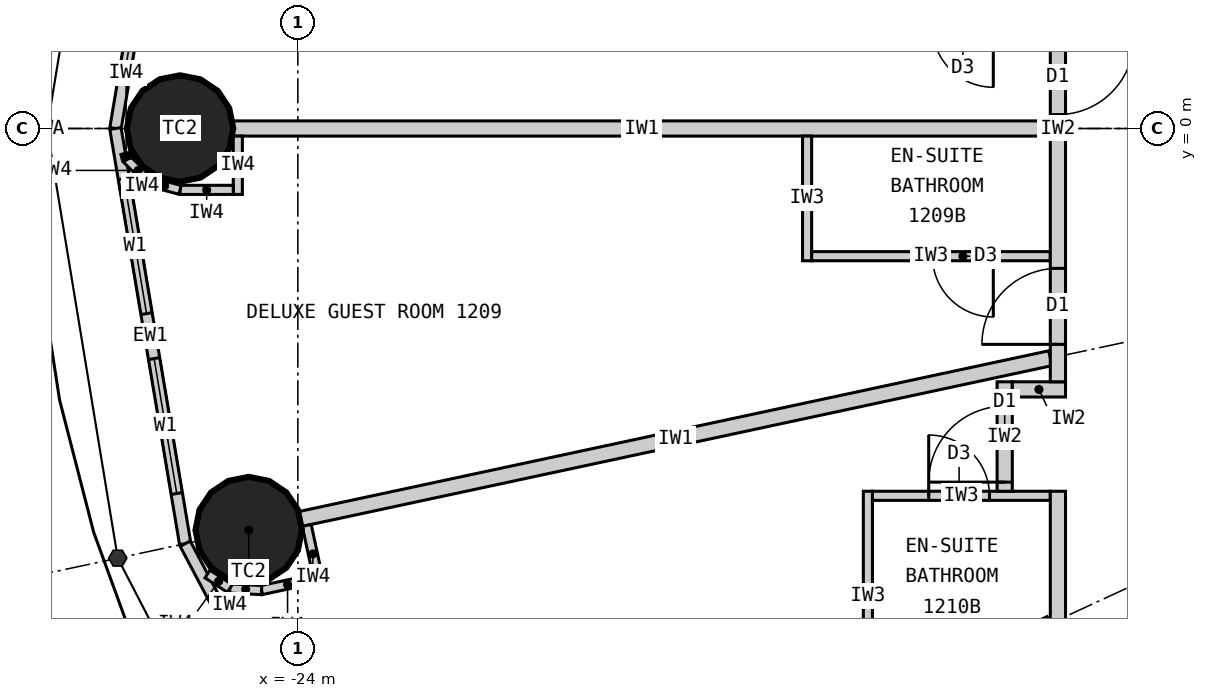
"""IFC4 building model, lengths in metres.
Left out: names, types, materials, properties, quantities, classifications, styles, units other than length and angle.
Written with IfcOpenShell. Run it as: python <this file> out.ifc"""

import sys

from ifc_helpers import new_model, si_unit, direction, frame, frame_2d, origin, origin_2d, place, context, subcontext, project, spatial, rectangle, circle, extrude, element, fill, save


model = new_model("IFC4")
c1 = context("Model", 3, precision=1e-05, world=origin(), true_north=direction((0.0, 1.0)))
c2 = subcontext(c1, "Body", "Model", "MODEL_VIEW")
j1 = project(units=[si_unit("LENGTHUNIT", "METRE"), si_unit("PLANEANGLEUNIT", "RADIAN")], contexts=[c1])
p1 = place(None, origin())
s1 = spatial("IfcSite", under=j1, at=p1, CompositionType="ELEMENT")
p2 = place(p1, origin())
s2 = spatial("IfcBuilding", under=s1, at=p2, CompositionType="ELEMENT")
p3 = place(p2, frame((0.0, 0.0, 54.0)))
s3 = spatial("IfcBuildingStorey", under=s2, at=p3, CompositionType="ELEMENT", Elevation=54.0)
for number, where, z_axis, x_axis in (
    (1, (-25.55, 0.0, 0.0), (0.0, 0.0, 1.0), (1.0, 0.0, 0.0)),
    (2, (-24.647, -5.283, 0.0), (0.0, 0.0, 1.0), (1.0, 0.0, 0.0)),
):
    element("IfcColumn", number, at=place(p3, frame(where, z_axis=z_axis, x_axis=x_axis)), inside=s3, PredefinedType="COLUMN", context=c2, shape_type="SweptSolid", body=[
        extrude(circle(Radius=0.7, at=origin_2d()), origin(), (0.0, 0.0, 1.0), 3.3),
    ])
p4 = place(p3, frame((-25.482, 5.462, 0.0), z_axis=(0.0, 0.0, 1.0), x_axis=(-0.165642551694, -0.986185857264, 0.0)))
e3 = element("IfcWall", 3, at=p4, inside=s3, PredefinedType="ELEMENTEDWALL", context=c2, shape_type="SweptSolid", body=[
    extrude(rectangle(XDim=5.539, YDim=0.15, at=frame_2d((2.77, 0.0))), origin(), (0.0, 0.0, 1.0), 3.12),
])
p5 = place(p4, frame((0.669, 0.0, 0.9)))
e4 = element("IfcOpeningElement", 4, at=p5, cuts=e3, PredefinedType="OPENING", context=c2, shape_type="SweptSolid", body=[
    extrude(rectangle(XDim=1.8, YDim=1.9, at=frame_2d((0.9, 0.95))), frame((0.0, 0.085, 0.0), z_axis=(0.0, -1.0, 0.0), x_axis=(1.0, 0.0, 0.0)), (0.0, 0.0, 1.0), 0.17),
])
p6 = place(p4, frame((3.07, 0.0, 0.9)))
e5 = element("IfcOpeningElement", 5, at=p6, cuts=e3, PredefinedType="OPENING", context=c2, shape_type="SweptSolid", body=[
    extrude(rectangle(XDim=1.8, YDim=1.9, at=frame_2d((0.9, 0.95))), frame((0.0, 0.085, 0.0), z_axis=(0.0, -1.0, 0.0), x_axis=(1.0, 0.0, 0.0)), (0.0, 0.0, 1.0), 0.17),
])
p7 = place(p3, frame((-26.4, 0.0, 0.0), z_axis=(0.0, 0.0, 1.0), x_axis=(0.165642551694, -0.986185857264, 0.0)))
e6 = element("IfcWall", 6, at=p7, inside=s3, PredefinedType="ELEMENTEDWALL", context=c2, shape_type="SweptSolid", body=[
    extrude(rectangle(XDim=5.539, YDim=0.15, at=frame_2d((2.77, 0.0))), origin(), (0.0, 0.0, 1.0), 3.12),
])
p8 = place(p7, frame((0.669, 0.0, 0.9)))
e7 = element("IfcOpeningElement", 7, at=p8, cuts=e6, PredefinedType="OPENING", context=c2, shape_type="SweptSolid", body=[
    extrude(rectangle(XDim=1.8, YDim=1.9, at=frame_2d((0.9, 0.95))), frame((0.0, 0.085, 0.0), z_axis=(0.0, -1.0, 0.0), x_axis=(1.0, 0.0, 0.0)), (0.0, 0.0, 1.0), 0.17),
])
p9 = place(p7, frame((3.07, 0.0, 0.9)))
e8 = element("IfcOpeningElement", 8, at=p9, cuts=e6, PredefinedType="OPENING", context=c2, shape_type="SweptSolid", body=[
    extrude(rectangle(XDim=1.8, YDim=1.9, at=frame_2d((0.9, 0.95))), frame((0.0, 0.085, 0.0), z_axis=(0.0, -1.0, 0.0), x_axis=(1.0, 0.0, 0.0)), (0.0, 0.0, 1.0), 0.17),
])
p10 = place(p3, frame((-25.482, -5.462, 0.0), z_axis=(0.0, 0.0, 1.0), x_axis=(0.467296867008, -0.884100468321, 0.0)))
e9 = element("IfcWall", 9, at=p10, inside=s3, PredefinedType="ELEMENTEDWALL", context=c2, shape_type="SweptSolid", body=[
    extrude(rectangle(XDim=5.734, YDim=0.15, at=frame_2d((2.867, 0.0))), origin(), (0.0, 0.0, 1.0), 3.12),
])
p11 = place(p10, frame((0.767, 0.0, 0.9)))
e10 = element("IfcOpeningElement", 10, at=p11, cuts=e9, PredefinedType="OPENING", context=c2, shape_type="SweptSolid", body=[
    extrude(rectangle(XDim=1.8, YDim=1.9, at=frame_2d((0.9, 0.95))), frame((0.0, 0.085, 0.0), z_axis=(0.0, -1.0, 0.0), x_axis=(1.0, 0.0, 0.0)), (0.0, 0.0, 1.0), 0.17),
])
p12 = place(p10, frame((3.167, 0.0, 0.9)))
e11 = element("IfcOpeningElement", 11, at=p12, cuts=e9, PredefinedType="OPENING", context=c2, shape_type="SweptSolid", body=[
    extrude(rectangle(XDim=1.8, YDim=1.9, at=frame_2d((0.9, 0.95))), frame((0.0, 0.085, 0.0), z_axis=(0.0, -1.0, 0.0), x_axis=(1.0, 0.0, 0.0)), (0.0, 0.0, 1.0), 0.17),
])
p13 = place(p3, frame((-14.1, 0.0, 0.0), z_axis=(0.0, 0.0, 1.0), x_axis=(-1.0, 0.0, 0.0)))
e12 = element("IfcWall", 12, at=p13, inside=s3, PredefinedType="PARTITIONING", context=c2, shape_type="SweptSolid", body=[
    extrude(rectangle(XDim=10.75, YDim=0.2, at=frame_2d((5.375, 0.0))), origin(), (0.0, 0.0, 1.0), 2.27),
])
p14 = place(p3, frame((-14.1, -3.022, 0.0), z_axis=(0.0, 0.0, 1.0), x_axis=(-0.977790014929, -0.209586943072, 0.0)))
e13 = element("IfcWall", 13, at=p14, inside=s3, PredefinedType="PARTITIONING", context=c2, shape_type="SweptSolid", body=[
    extrude(rectangle(XDim=10.087, YDim=0.2, at=frame_2d((5.043, 0.0))), origin(), (0.0, 0.0, 1.0), 2.32),
])
p15 = place(p3, frame((-14.1, -6.512, 0.0), z_axis=(0.0, 0.0, 1.0), x_axis=(-0.907832871056, -0.419332181247, 0.0)))
e14 = element("IfcWall", 14, at=p15, inside=s3, PredefinedType="PARTITIONING", context=c2, shape_type="SweptSolid", body=[
    extrude(rectangle(XDim=8.023, YDim=0.2, at=frame_2d((4.011, 0.0))), origin(), (0.0, 0.0, 1.0), 2.32),
])
p16 = place(p3, frame((-17.3, -0.1, 0.0), z_axis=(0.0, 0.0, 1.0), x_axis=(0.0, -1.0, 0.0)))
e15 = element("IfcWall", 15, at=p16, inside=s3, PredefinedType="PARTITIONING", context=c2, shape_type="SweptSolid", body=[
    extrude(rectangle(XDim=1.64, YDim=0.12, at=frame_2d((0.82, 0.0))), origin(), (0.0, 0.0, 1.0), 3.12),
])
p17 = place(p3, frame((-14.1, -1.68, 0.0), z_axis=(0.0, 0.0, 1.0), x_axis=(-1.0, 0.0, 0.0)))
e16 = element("IfcWall", 16, at=p17, inside=s3, PredefinedType="PARTITIONING", context=c2, shape_type="SweptSolid", body=[
    extrude(rectangle(XDim=3.14, YDim=0.12, at=frame_2d((1.57, 0.0))), origin(), (0.0, 0.0, 1.0), 3.12),
])
p18 = place(p17, frame((0.75, 0.0, 0.0)))
e17 = element("IfcOpeningElement", 17, at=p18, cuts=e16, PredefinedType="OPENING", context=c2, shape_type="SweptSolid", body=[
    extrude(rectangle(XDim=0.8, YDim=2.1, at=frame_2d((0.4, 1.05))), frame((0.0, 0.07, 0.0), z_axis=(0.0, -1.0, 0.0), x_axis=(1.0, 0.0, 0.0)), (0.0, 0.0, 1.0), 0.14),
])
p19 = place(p3, frame((-16.5, -7.521, 0.0), z_axis=(0.0, 0.0, 1.0), x_axis=(0.0, 1.0, 0.0)))
e18 = element("IfcWall", 18, at=p19, inside=s3, PredefinedType="PARTITIONING", context=c2, shape_type="SweptSolid", body=[
    extrude(rectangle(XDim=2.749, YDim=0.12, at=frame_2d((1.374, 0.0))), origin(), (0.0, 0.0, 1.0), 3.12),
])
p20 = place(p3, frame((-14.1, -4.833, 0.0), z_axis=(0.0, 0.0, 1.0), x_axis=(-1.0, 0.0, 0.0)))
e19 = element("IfcWall", 19, at=p20, inside=s3, PredefinedType="PARTITIONING", context=c2, shape_type="SweptSolid", body=[
    extrude(rectangle(XDim=2.34, YDim=0.12, at=frame_2d((1.17, 0.0))), origin(), (0.0, 0.0, 1.0), 3.12),
])
p21 = place(p20, frame((0.8, 0.0, 0.0)))
e20 = element("IfcOpeningElement", 20, at=p21, cuts=e19, PredefinedType="OPENING", context=c2, shape_type="SweptSolid", body=[
    extrude(rectangle(XDim=0.8, YDim=2.1, at=frame_2d((0.4, 1.05))), frame((0.0, 0.07, 0.0), z_axis=(0.0, -1.0, 0.0), x_axis=(1.0, 0.0, 0.0)), (0.0, 0.0, 1.0), 0.14),
])
p22 = place(p3, frame((-14.7, -3.333, 0.0), z_axis=(0.0, 0.0, 1.0), x_axis=(0.0, -1.0, 0.0)))
e21 = element("IfcWall", 21, at=p22, inside=s3, PredefinedType="PARTITIONING", context=c2, shape_type="SweptSolid", body=[
    extrude(rectangle(XDim=1.44, YDim=0.2, at=frame_2d((0.72, 0.0))), origin(), (0.0, 0.0, 1.0), 3.12),
])
p23 = place(p22, frame((0.32, 0.0, 0.0)))
e22 = element("IfcOpeningElement", 22, at=p23, cuts=e21, PredefinedType="OPENING", context=c2, shape_type="SweptSolid", body=[
    extrude(rectangle(XDim=1.0, YDim=2.2, at=frame_2d((0.5, 1.1))), frame((0.0, 0.11, 0.0), z_axis=(0.0, -1.0, 0.0), x_axis=(1.0, 0.0, 0.0)), (0.0, 0.0, 1.0), 0.22),
])
p24 = place(p3, frame((-13.9, -3.433, 0.0), z_axis=(0.0, 0.0, 1.0), x_axis=(-1.0, 0.0, 0.0)))
e23 = element("IfcWall", 23, at=p24, inside=s3, PredefinedType="PARTITIONING", context=c2, shape_type="SweptSolid", body=[
    extrude(rectangle(XDim=0.7, YDim=0.2, at=frame_2d((0.35, 0.0))), origin(), (0.0, 0.0, 1.0), 2.32),
])
p25 = place(p3, frame((-14.0, 3.333, 0.0), z_axis=(0.0, 0.0, 1.0), x_axis=(0.0, -1.0, 0.0)))
e24 = element("IfcWall", 24, at=p25, inside=s3, PredefinedType="PARTITIONING", context=c2, shape_type="SweptSolid", body=[
    extrude(rectangle(XDim=6.665, YDim=0.2, at=frame_2d((3.333, 0.0))), origin(), (0.0, 0.0, 1.0), 3.12),
])
p26 = place(p25, frame((2.15, 0.0, 0.0)))
e25 = element("IfcOpeningElement", 25, at=p26, cuts=e24, PredefinedType="OPENING", context=c2, shape_type="SweptSolid", body=[
    extrude(rectangle(XDim=1.0, YDim=2.2, at=frame_2d((0.5, 1.1))), frame((0.0, 0.11, 0.0), z_axis=(0.0, -1.0, 0.0), x_axis=(1.0, 0.0, 0.0)), (0.0, 0.0, 1.0), 0.22),
])
p27 = place(p25, frame((5.173, 0.0, 0.0)))
e26 = element("IfcOpeningElement", 26, at=p27, cuts=e24, PredefinedType="OPENING", context=c2, shape_type="SweptSolid", body=[
    extrude(rectangle(XDim=1.0, YDim=2.2, at=frame_2d((0.5, 1.1))), frame((0.0, 0.11, 0.0), z_axis=(0.0, -1.0, 0.0), x_axis=(1.0, 0.0, 0.0)), (0.0, 0.0, 1.0), 0.22),
])
p28 = place(p3, frame((-14.0, -4.772, 0.0), z_axis=(0.0, 0.0, 1.0), x_axis=(0.0, -1.0, 0.0)))
e27 = element("IfcWall", 27, at=p28, inside=s3, PredefinedType="PARTITIONING", context=c2, shape_type="SweptSolid", body=[
    extrude(rectangle(XDim=5.127, YDim=0.2, at=frame_2d((2.564, 0.0))), origin(), (0.0, 0.0, 1.0), 3.12),
])
p29 = place(p28, frame((4.025, 0.0, 0.0)))
e28 = element("IfcOpeningElement", 28, at=p29, cuts=e27, PredefinedType="OPENING", context=c2, shape_type="SweptSolid", body=[
    extrude(rectangle(XDim=1.0, YDim=2.2, at=frame_2d((0.5, 1.1))), frame((0.0, 0.11, 0.0), z_axis=(0.0, -1.0, 0.0), x_axis=(1.0, 0.0, 0.0)), (0.0, 0.0, 1.0), 0.22),
])
p30 = place(p3, frame((-24.79, -0.1, 0.0), z_axis=(0.0, 0.0, 1.0), x_axis=(0.0, -1.0, 0.0)))
e29 = element("IfcWall", 29, at=p30, inside=s3, PredefinedType="PARTITIONING", context=c2, shape_type="SweptSolid", body=[
    extrude(rectangle(XDim=0.767, YDim=0.12, at=frame_2d((0.384, 0.0))), origin(), (0.0, 0.0, 1.0), 3.12),
])
p31 = place(p3, frame((-24.85, -0.808, 0.0), z_axis=(0.0, 0.0, 1.0), x_axis=(-1.0, 0.0, 0.0)))
e30 = element("IfcWall", 30, at=p31, inside=s3, PredefinedType="PARTITIONING", context=c2, shape_type="SweptSolid", body=[
    extrude(rectangle(XDim=0.7, YDim=0.12, at=frame_2d((0.35, 0.0))), origin(), (0.0, 0.0, 1.0), 3.12),
])
p32 = place(p3, frame((-25.55, -0.808, 0.0), z_axis=(0.0, 0.0, 1.0), x_axis=(-0.965807183573, 0.2592614205, 0.0)))
e31 = element("IfcWall", 31, at=p32, inside=s3, PredefinedType="PARTITIONING", context=c2, shape_type="SweptSolid", body=[
    extrude(rectangle(XDim=0.418, YDim=0.12, at=frame_2d((0.209, 0.0))), origin(), (0.0, 0.0, 1.0), 3.12),
])
p33 = place(p3, frame((-25.954, -0.699, 0.0), z_axis=(0.0, 0.0, 1.0), x_axis=(-0.707106781187, 0.707106781187, 0.0)))
e32 = element("IfcWall", 32, at=p33, inside=s3, PredefinedType="PARTITIONING", context=c2, shape_type="SweptSolid", body=[
    extrude(rectangle(XDim=0.418, YDim=0.12, at=frame_2d((0.209, 0.0))), origin(), (0.0, 0.0, 1.0), 3.12),
])
p34 = place(p3, frame((-26.249, -0.404, 0.0), z_axis=(0.0, 0.0, 1.0), x_axis=(-0.259754282609, 0.965674744759, 0.0)))
e33 = element("IfcWall", 33, at=p34, inside=s3, PredefinedType="PARTITIONING", context=c2, shape_type="SweptSolid", body=[
    extrude(rectangle(XDim=0.08, YDim=0.12, at=frame_2d((0.04, 0.0))), origin(), (0.0, 0.0, 1.0), 3.12),
])
p35 = place(p3, frame((-23.883, -5.222, 0.0), z_axis=(0.0, 0.0, 1.0), x_axis=(0.209311842415, -0.977848941619, 0.0)))
e34 = element("IfcWall", 34, at=p35, inside=s3, PredefinedType="PARTITIONING", context=c2, shape_type="SweptSolid", body=[
    extrude(rectangle(XDim=0.768, YDim=0.12, at=frame_2d((0.384, 0.0))), origin(), (0.0, 0.0, 1.0), 3.12),
])
p36 = place(p3, frame((-23.793, -5.926, 0.0), z_axis=(0.0, 0.0, 1.0), x_axis=(-0.977792206673, -0.209576717621, 0.0)))
e35 = element("IfcWall", 35, at=p36, inside=s3, PredefinedType="PARTITIONING", context=c2, shape_type="SweptSolid", body=[
    extrude(rectangle(XDim=0.7, YDim=0.12, at=frame_2d((0.35, 0.0))), origin(), (0.0, 0.0, 1.0), 3.12),
])
p37 = place(p3, frame((-24.478, -6.073, 0.0), z_axis=(0.0, 0.0, 1.0), x_axis=(-0.998708262812, 0.05081147302, 0.0)))
e36 = element("IfcWall", 36, at=p37, inside=s3, PredefinedType="PARTITIONING", context=c2, shape_type="SweptSolid", body=[
    extrude(rectangle(XDim=0.418, YDim=0.12, at=frame_2d((0.209, 0.0))), origin(), (0.0, 0.0, 1.0), 3.12),
])
p38 = place(p3, frame((-24.895, -6.052, 0.0), z_axis=(0.0, 0.0, 1.0), x_axis=(-0.839495197275, 0.54336710772, 0.0)))
e37 = element("IfcWall", 37, at=p38, inside=s3, PredefinedType="PARTITIONING", context=c2, shape_type="SweptSolid", body=[
    extrude(rectangle(XDim=0.35, YDim=0.12, at=frame_2d((0.175, 0.0))), origin(), (0.0, 0.0, 1.0), 3.12),
])
p39 = place(p6, origin())
e38 = element("IfcWindow", 38, at=p39, inside=s3, PartitioningType="SINGLE_PANEL", PredefinedType="WINDOW", context=c2, shape_type="SweptSolid", body=[
    extrude(rectangle(XDim=1.8, YDim=1.9, at=frame_2d((0.9, 0.95))), frame((0.0, 0.03, 0.0), z_axis=(0.0, -1.0, 0.0), x_axis=(1.0, 0.0, 0.0)), (0.0, 0.0, 1.0), 0.06),
])
fill(e5, e38)
p40 = place(p8, origin())
e39 = element("IfcWindow", 39, at=p40, inside=s3, PartitioningType="SINGLE_PANEL", PredefinedType="WINDOW", context=c2, shape_type="SweptSolid", body=[
    extrude(rectangle(XDim=1.8, YDim=1.9, at=frame_2d((0.9, 0.95))), frame((0.0, 0.03, 0.0), z_axis=(0.0, -1.0, 0.0), x_axis=(1.0, 0.0, 0.0)), (0.0, 0.0, 1.0), 0.06),
])
fill(e7, e39)
p41 = place(p9, origin())
e40 = element("IfcWindow", 40, at=p41, inside=s3, PartitioningType="SINGLE_PANEL", PredefinedType="WINDOW", context=c2, shape_type="SweptSolid", body=[
    extrude(rectangle(XDim=1.8, YDim=1.9, at=frame_2d((0.9, 0.95))), frame((0.0, 0.03, 0.0), z_axis=(0.0, -1.0, 0.0), x_axis=(1.0, 0.0, 0.0)), (0.0, 0.0, 1.0), 0.06),
])
fill(e8, e40)
p42 = place(p11, origin())
e41 = element("IfcWindow", 41, at=p42, inside=s3, PartitioningType="SINGLE_PANEL", PredefinedType="WINDOW", context=c2, shape_type="SweptSolid", body=[
    extrude(rectangle(XDim=1.8, YDim=1.9, at=frame_2d((0.9, 0.95))), frame((0.0, 0.03, 0.0), z_axis=(0.0, -1.0, 0.0), x_axis=(1.0, 0.0, 0.0)), (0.0, 0.0, 1.0), 0.06),
])
fill(e10, e41)
p43 = place(p26, origin())
e42 = element("IfcDoor", 42, at=p43, inside=s3, OperationType="SINGLE_SWING_LEFT", PredefinedType="DOOR", context=c2, shape_type="SweptSolid", body=[
    extrude(rectangle(XDim=1.0, YDim=2.2, at=frame_2d((0.5, 1.1))), frame((0.0, 0.025, 0.0), z_axis=(0.0, -1.0, 0.0), x_axis=(1.0, 0.0, 0.0)), (0.0, 0.0, 1.0), 0.05),
])
fill(e25, e42)
p44 = place(p18, origin())
e43 = element("IfcDoor", 43, at=p44, inside=s3, OperationType="SINGLE_SWING_LEFT", PredefinedType="DOOR", context=c2, shape_type="SweptSolid", body=[
    extrude(rectangle(XDim=0.8, YDim=2.1, at=frame_2d((0.4, 1.05))), frame((0.0, 0.025, 0.0), z_axis=(0.0, -1.0, 0.0), x_axis=(1.0, 0.0, 0.0)), (0.0, 0.0, 1.0), 0.05),
])
fill(e17, e43)
p45 = place(p27, origin())
e44 = element("IfcDoor", 44, at=p45, inside=s3, OperationType="SINGLE_SWING_RIGHT", PredefinedType="DOOR", context=c2, shape_type="SweptSolid", body=[
    extrude(rectangle(XDim=1.0, YDim=2.2, at=frame_2d((0.5, 1.1))), frame((0.0, 0.025, 0.0), z_axis=(0.0, -1.0, 0.0), x_axis=(1.0, 0.0, 0.0)), (0.0, 0.0, 1.0), 0.05),
])
fill(e26, e44)
p46 = place(p21, origin())
e45 = element("IfcDoor", 45, at=p46, inside=s3, OperationType="SINGLE_SWING_RIGHT", PredefinedType="DOOR", context=c2, shape_type="SweptSolid", body=[
    extrude(rectangle(XDim=0.8, YDim=2.1, at=frame_2d((0.4, 1.05))), frame((0.0, 0.025, 0.0), z_axis=(0.0, -1.0, 0.0), x_axis=(1.0, 0.0, 0.0)), (0.0, 0.0, 1.0), 0.05),
])
fill(e20, e45)
p47 = place(p23, origin())
e46 = element("IfcDoor", 46, at=p47, inside=s3, OperationType="SINGLE_SWING_RIGHT", PredefinedType="DOOR", context=c2, shape_type="SweptSolid", body=[
    extrude(rectangle(XDim=1.0, YDim=2.2, at=frame_2d((0.5, 1.1))), frame((0.0, 0.025, 0.0), z_axis=(0.0, -1.0, 0.0), x_axis=(1.0, 0.0, 0.0)), (0.0, 0.0, 1.0), 0.05),
])
fill(e22, e46)
save(model, sys.argv[1])
